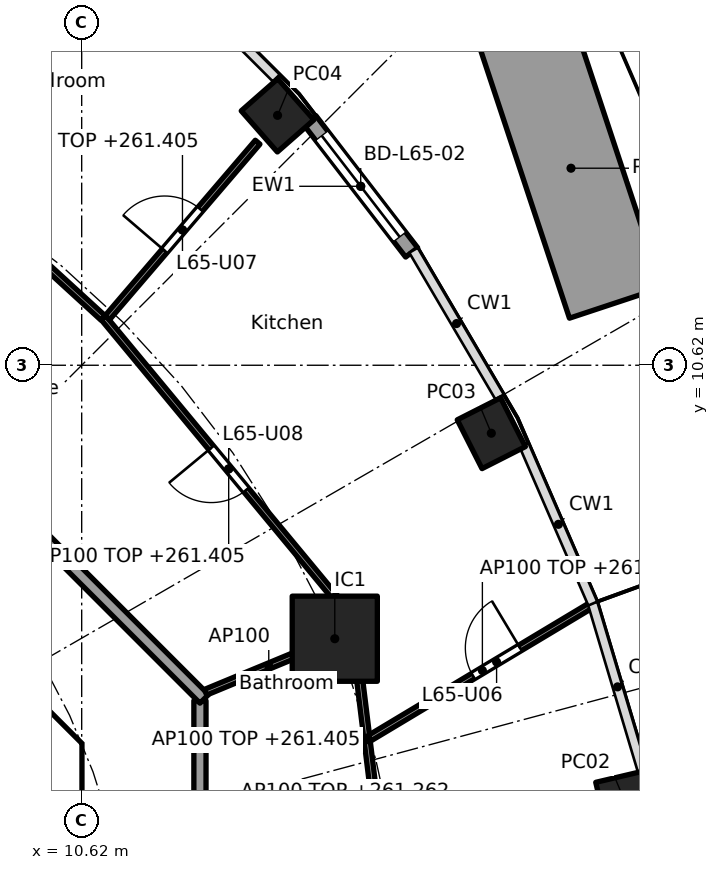
"""IFC4 building model, lengths in metres.
Left out: names, types, materials, properties, quantities, classifications, styles, units other than length and angle.
Written with IfcOpenShell. Run it as: python <this file> out.ifc"""

import sys

from ifc_helpers import new_model, si_unit, direction, frame, frame_2d, origin, origin_2d, place, context, subcontext, project, spatial, polyline, rectangle, hollow_rectangle, outline, extrude, element, fill, save


model = new_model("IFC4")
c1 = context("Model", 3, precision=1e-05, world=origin(), true_north=direction((0.0, 1.0)))
c2 = subcontext(c1, "Body", "Model", "MODEL_VIEW")
j1 = project(units=[si_unit("LENGTHUNIT", "METRE"), si_unit("PLANEANGLEUNIT", "RADIAN")], contexts=[c1])
p1 = place(None, origin())
s1 = spatial("IfcSite", under=j1, at=p1, CompositionType="ELEMENT")
p2 = place(p1, origin())
s2 = spatial("IfcBuilding", under=s1, at=p2, CompositionType="ELEMENT")
p3 = place(p2, frame((0.0, 0.0, 258.5)))
s3 = spatial("IfcBuildingStorey", under=s2, at=p3, CompositionType="ELEMENT", Elevation=258.5)
for number, where, z_axis, x_axis in (
    (1, (19.566, 3.415, -0.26), (0.0, 0.0, 1.0), (-0.229, 0.973, 0.0)),
    (2, (17.356, 9.502, -0.26), (0.0, 0.0, 1.0), (-0.452, 0.892, 0.0)),
    (3, (13.841, 14.73, -0.26), (0.0, 0.0, 1.0), (-0.66, 0.751, 0.0)),
):
    element("IfcColumn", number, at=place(p3, frame(where, z_axis=z_axis, x_axis=x_axis)), inside=s3, PredefinedType="COLUMN", context=c2, shape_type="SweptSolid", body=[
        extrude(hollow_rectangle(XDim=0.9, YDim=0.8, WallThickness=0.028, at=origin_2d()), origin(), (0.0, 0.0, 1.0), 3.96),
    ])
p4 = place(p3, frame((14.782, 6.123, 0.0), z_axis=(0.0, 0.0, 1.0), x_axis=(1.0, 0.0, 0.0)))
e4 = element("IfcColumn", 4, at=p4, inside=s3, PredefinedType="COLUMN", context=c2, shape_type="SweptSolid", body=[
    extrude(rectangle(XDim=1.4, YDim=1.4, at=origin_2d()), origin(), (0.0, 0.0, 1.0), 3.7),
])
p5 = place(p3, frame((14.37, 14.65, 0.0), z_axis=(0.0, 0.0, 1.0), x_axis=(0.610475325435, -0.79203527512, 0.0)))
e5 = element("IfcWall", 5, at=p5, inside=s3, PredefinedType="SOLIDWALL", context=c2, shape_type="SweptSolid", body=[
    extrude(rectangle(XDim=2.746, YDim=0.25, at=frame_2d((1.373, 0.0))), origin(), (0.0, 0.0, 1.0), 3.44),
])
p6 = place(p5, frame((0.323, 0.0, 0.0)))
e6 = element("IfcOpeningElement", 6, at=p6, cuts=e5, PredefinedType="OPENING", context=c2, shape_type="SweptSolid", body=[
    extrude(rectangle(XDim=2.1, YDim=2.4, at=frame_2d((1.05, 1.2))), frame((0.0, 0.135, 0.0), z_axis=(0.0, -1.0, 0.0), x_axis=(1.0, 0.0, 0.0)), (0.0, 0.0, 1.0), 0.27),
])
p7 = place(p3, frame((17.933, 16.075, 0.0), z_axis=(0.0, 0.0, 1.0), x_axis=(0.314563421238, -0.949236458433, 0.0)))
e7 = element("IfcWall", 7, at=p7, inside=s3, PredefinedType="SOLIDWALL", context=c2, shape_type="SweptSolid", body=[
    extrude(rectangle(XDim=4.666, YDim=1.6, at=frame_2d((2.333, 0.0))), origin(), (0.0, 0.0, 1.0), 1.1),
])
p8 = place(p3, frame((9.988, 4.613, 0.0), z_axis=(0.0, 0.0, 1.0), x_axis=(-0.707106781187, 0.707106781187, 0.0)))
e8 = element("IfcWall", 8, at=p8, inside=s3, PredefinedType="SHEAR", context=c2, shape_type="SweptSolid", body=[
    extrude(rectangle(XDim=7.602, YDim=0.6, at=frame_2d((3.801, 0.0))), origin(), (0.0, 0.0, 1.0), 3.44),
])
p9 = place(p8, frame((3.201, 0.0, 0.0)))
e9 = element("IfcOpeningElement", 9, at=p9, cuts=e8, PredefinedType="OPENING", context=c2, shape_type="SweptSolid", body=[
    extrude(rectangle(XDim=1.2, YDim=2.1, at=frame_2d((0.6, 1.05))), frame((0.0, 0.31, 0.0), z_axis=(0.0, -1.0, 0.0), x_axis=(1.0, 0.0, 0.0)), (0.0, 0.0, 1.0), 0.62),
])
p10 = place(p3, origin())
e10 = element("IfcWall", 10, at=p10, inside=s3, PredefinedType="SHEAR", context=c2, shape_type="SweptSolid", body=[
    extrude(outline(polyline([(9.776, -4.401), (10.025, -4.152), (10.025, -3.801), (10.025, 4.152), (9.776, 4.401), (10.2, 4.825), (10.625, 4.401), (10.625, -4.401), (10.2, -4.825), (9.776, -4.401)])), origin(), (0.0, 0.0, 1.0), 3.44),
])
p11 = place(p3, frame((12.565, -5.104, 0.0), z_axis=(0.0, 0.0, 1.0), x_axis=(0.0, 1.0, 0.0)))
e11 = element("IfcWall", 11, at=p11, inside=s3, PredefinedType="PARTITIONING", context=c2, shape_type="SweptSolid", body=[
    extrude(rectangle(XDim=10.209, YDim=0.2, at=frame_2d((5.104, 0.0))), origin(), (0.0, 0.0, 1.0), 3.44),
])
p12 = place(p11, frame((4.604, 0.0, 0.0)))
e12 = element("IfcOpeningElement", 12, at=p12, cuts=e11, PredefinedType="OPENING", context=c2, shape_type="SweptSolid", body=[
    extrude(rectangle(XDim=1.0, YDim=2.1, at=frame_2d((0.5, 1.05))), frame((0.0, 0.11, 0.0), z_axis=(0.0, -1.0, 0.0), x_axis=(1.0, 0.0, 0.0)), (0.0, 0.0, 1.0), 0.22),
])
p13 = place(p3, frame((12.635, 5.134, 0.0), z_axis=(0.0, 0.0, 1.0), x_axis=(-0.707106781187, 0.707106781187, 0.0)))
e13 = element("IfcWall", 13, at=p13, inside=s3, PredefinedType="PARTITIONING", context=c2, shape_type="SweptSolid", body=[
    extrude(rectangle(XDim=10.609, YDim=0.2, at=frame_2d((5.305, 0.0))), origin(), (0.0, 0.0, 1.0), 3.44),
])
p14 = place(p3, frame((15.552, 2.508, 0.0), z_axis=(0.0, 0.0, 1.0), x_axis=(-0.12196631785, 0.992534239868, 0.0)))
e14 = element("IfcWall", 14, at=p14, inside=s3, PredefinedType="PARTITIONING", context=c2, shape_type="SweptSolid", body=[
    extrude(rectangle(XDim=3.937, YDim=0.1, at=frame_2d((1.969, 0.0))), origin(), (0.0, 0.0, 1.0), 2.905),
])
p15 = place(p3, frame((15.355, 4.488, 0.0), z_axis=(0.0, 0.0, 1.0), x_axis=(0.85763237524, 0.514263268123, 0.0)))
e15 = element("IfcWall", 15, at=p15, inside=s3, PredefinedType="PARTITIONING", context=c2, shape_type="SweptSolid", body=[
    extrude(rectangle(XDim=4.324, YDim=0.1, at=frame_2d((2.162, 0.0))), origin(), (0.0, 0.0, 1.0), 2.983),
])
p16 = place(p15, frame((1.985, 0.0, 0.0)))
e16 = element("IfcOpeningElement", 16, at=p16, cuts=e15, PredefinedType="OPENING", context=c2, shape_type="SweptSolid", body=[
    extrude(rectangle(XDim=0.9, YDim=2.1, at=frame_2d((0.45, 1.05))), frame((0.0, 0.06, 0.0), z_axis=(0.0, -1.0, 0.0), x_axis=(1.0, 0.0, 0.0)), (0.0, 0.0, 1.0), 0.12),
])
p17 = place(p3, frame((12.657, 5.243, 0.0), z_axis=(0.0, 0.0, 1.0), x_axis=(0.923864733477, 0.382719158442, 0.0)))
e17 = element("IfcWall", 17, at=p17, inside=s3, PredefinedType="PARTITIONING", context=c2, shape_type="SweptSolid", body=[
    extrude(rectangle(XDim=2.25, YDim=0.1, at=frame_2d((1.125, 0.0))), origin(), (0.0, 0.0, 1.0), 3.44),
])
p18 = place(p3, frame((15.098, 6.427, 0.0), z_axis=(0.0, 0.0, 1.0), x_axis=(-0.637936555536, 0.770088924158, 0.0)))
e18 = element("IfcWall", 18, at=p18, inside=s3, PredefinedType="PARTITIONING", context=c2, shape_type="SweptSolid", body=[
    extrude(rectangle(XDim=6.46, YDim=0.1, at=frame_2d((3.23, 0.0))), origin(), (0.0, 0.0, 1.0), 2.905),
])
p19 = place(p18, frame((2.78, 0.0, 0.0)))
e19 = element("IfcOpeningElement", 19, at=p19, cuts=e18, PredefinedType="OPENING", context=c2, shape_type="SweptSolid", body=[
    extrude(rectangle(XDim=0.9, YDim=2.1, at=frame_2d((0.45, 1.05))), frame((0.0, 0.06, 0.0), z_axis=(0.0, -1.0, 0.0), x_axis=(1.0, 0.0, 0.0)), (0.0, 0.0, 1.0), 0.12),
])
p20 = place(p3, frame((11.041, 11.402, 0.0), z_axis=(0.0, 0.0, 1.0), x_axis=(0.650558544325, 0.759456108282, 0.0)))
e20 = element("IfcWall", 20, at=p20, inside=s3, PredefinedType="PARTITIONING", context=c2, shape_type="SweptSolid", body=[
    extrude(rectangle(XDim=3.8, YDim=0.1, at=frame_2d((1.9, 0.0))), origin(), (0.0, 0.0, 1.0), 2.905),
])
p21 = place(p20, frame((1.45, 0.0, 0.0)))
e21 = element("IfcOpeningElement", 21, at=p21, cuts=e20, PredefinedType="OPENING", context=c2, shape_type="SweptSolid", body=[
    extrude(rectangle(XDim=0.9, YDim=2.1, at=frame_2d((0.45, 1.05))), frame((0.0, 0.06, 0.0), z_axis=(0.0, -1.0, 0.0), x_axis=(1.0, 0.0, 0.0)), (0.0, 0.0, 1.0), 0.12),
])
p22 = place(p3, frame((10.972, 11.398, 0.0), z_axis=(0.0, 0.0, 1.0), x_axis=(-0.737830272434, 0.674986288069, 0.0)))
e22 = element("IfcWall", 22, at=p22, inside=s3, PredefinedType="PARTITIONING", context=c2, shape_type="SweptSolid", body=[
    extrude(rectangle(XDim=5.827, YDim=0.1, at=frame_2d((2.914, 0.0))), origin(), (0.0, 0.0, 1.0), 2.905),
])
p23 = place(p6, origin())
e23 = element("IfcDoor", 23, at=p23, inside=s3, OperationType="SLIDING_TO_LEFT", PredefinedType="DOOR", context=c2, shape_type="SweptSolid", body=[
    extrude(rectangle(XDim=2.1, YDim=2.4, at=frame_2d((1.05, 1.2))), frame((0.0, 0.025, 0.0), z_axis=(0.0, -1.0, 0.0), x_axis=(1.0, 0.0, 0.0)), (0.0, 0.0, 1.0), 0.05),
])
fill(e6, e23)
p24 = place(p16, origin())
e24 = element("IfcDoor", 24, at=p24, inside=s3, OperationType="SINGLE_SWING_RIGHT", PredefinedType="DOOR", context=c2, shape_type="SweptSolid", body=[
    extrude(rectangle(XDim=0.9, YDim=2.1, at=frame_2d((0.45, 1.05))), frame((0.0, 0.025, 0.0), z_axis=(0.0, -1.0, 0.0), x_axis=(1.0, 0.0, 0.0)), (0.0, 0.0, 1.0), 0.05),
])
fill(e16, e24)
p25 = place(p21, origin())
e25 = element("IfcDoor", 25, at=p25, inside=s3, OperationType="SINGLE_SWING_LEFT", PredefinedType="DOOR", context=c2, shape_type="SweptSolid", body=[
    extrude(rectangle(XDim=0.9, YDim=2.1, at=frame_2d((0.45, 1.05))), frame((0.0, 0.025, 0.0), z_axis=(0.0, -1.0, 0.0), x_axis=(1.0, 0.0, 0.0)), (0.0, 0.0, 1.0), 0.05),
])
fill(e21, e25)
p26 = place(p19, origin())
e26 = element("IfcDoor", 26, at=p26, inside=s3, OperationType="SINGLE_SWING_RIGHT", PredefinedType="DOOR", context=c2, shape_type="SweptSolid", body=[
    extrude(rectangle(XDim=0.9, YDim=2.1, at=frame_2d((0.45, 1.05))), frame((0.0, 0.025, 0.0), z_axis=(0.0, -1.0, 0.0), x_axis=(1.0, 0.0, 0.0)), (0.0, 0.0, 1.0), 0.05),
])
fill(e19, e26)
save(model, sys.argv[1])
